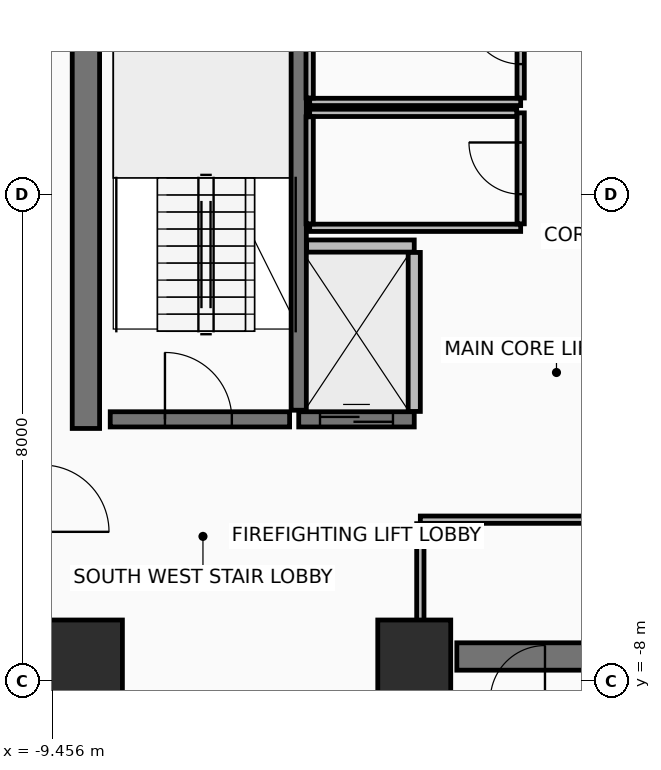
"""IFC4 building model, lengths in metres.
Left out: names, types, materials, properties, quantities, classifications, styles, units other than length and angle.
Written with IfcOpenShell. Run it as: python <this file> out.ifc"""

import sys

from ifc_helpers import new_model, si_unit, direction, frame, frame_2d, origin, origin_2d, place, context, subcontext, project, spatial, rectangle, extrude, element, fill, save


model = new_model("IFC4")
c1 = context("Model", 3, precision=1e-05, world=origin(), true_north=direction((0.0, 1.0)))
c2 = subcontext(c1, "Body", "Model", "MODEL_VIEW")
j1 = project(units=[si_unit("LENGTHUNIT", "METRE"), si_unit("PLANEANGLEUNIT", "RADIAN")], contexts=[c1])
p1 = place(None, origin())
s1 = spatial("IfcSite", under=j1, at=p1, CompositionType="ELEMENT")
p2 = place(p1, origin())
s2 = spatial("IfcBuilding", under=s1, at=p2, CompositionType="ELEMENT")
p3 = place(p2, frame((0.0, 0.0, 181.3)))
s3 = spatial("IfcBuildingStorey", under=s2, at=p3, CompositionType="ELEMENT", Elevation=181.3)
for number, where, z_axis, x_axis in (
    (1, (-8.9, -7.6, 0.0), (0.0, 0.0, 1.0), (1.0, 0.0, 0.0)),
    (2, (-3.5, -7.6, 0.0), (0.0, 0.0, 1.0), (1.0, 0.0, 0.0)),
):
    element("IfcColumn", number, at=place(p3, frame(where, z_axis=z_axis, x_axis=x_axis)), inside=s3, PredefinedType="COLUMN", context=c2, shape_type="SweptSolid", body=[
        extrude(rectangle(XDim=1.2, YDim=1.2, at=origin_2d()), origin(), (0.0, 0.0, 1.0), 3.6),
    ])
p4 = place(p3, frame((-2.8, -7.6, 0.0), z_axis=(0.0, 0.0, 1.0), x_axis=(1.0, 0.0, 0.0)))
e3 = element("IfcWall", 3, at=p4, inside=s3, PredefinedType="SHEAR", context=c2, shape_type="SweptSolid", body=[
    extrude(rectangle(XDim=5.38, YDim=0.45, at=frame_2d((2.69, 0.0))), origin(), (0.0, 0.0, 1.0), 3.42),
])
p5 = place(p3, frame((-8.9, -3.85, 0.0), z_axis=(0.0, 0.0, 1.0), x_axis=(0.0, 1.0, 0.0)))
e4 = element("IfcWall", 4, at=p5, inside=s3, PredefinedType="SHEAR", context=c2, shape_type="SweptSolid", body=[
    extrude(rectangle(XDim=10.7, YDim=0.45, at=frame_2d((5.35, 0.0))), origin(), (0.0, 0.0, 1.0), 3.42),
])
p6 = place(p3, frame((-5.4, -3.55, 0.0), z_axis=(0.0, 0.0, 1.0), x_axis=(0.0, 1.0, 0.0)))
e5 = element("IfcWall", 5, at=p6, inside=s3, PredefinedType="SHEAR", context=c2, shape_type="SweptSolid", body=[
    extrude(rectangle(XDim=7.3, YDim=0.25, at=frame_2d((3.65, 0.0))), origin(), (0.0, 0.0, 1.0), 3.42),
])
p7 = place(p3, frame((-8.5, -3.7, 0.0), z_axis=(0.0, 0.0, 1.0), x_axis=(1.0, 0.0, 0.0)))
e6 = element("IfcWall", 6, at=p7, inside=s3, PredefinedType="SHEAR", context=c2, shape_type="SweptSolid", body=[
    extrude(rectangle(XDim=2.95, YDim=0.25, at=frame_2d((1.475, 0.0))), origin(), (0.0, 0.0, 1.0), 3.42),
])
p8 = place(p7, frame((0.9, 0.0, 0.0)))
e7 = element("IfcOpeningElement", 7, at=p8, cuts=e6, PredefinedType="OPENING", context=c2, shape_type="SweptSolid", body=[
    extrude(rectangle(XDim=1.1, YDim=2.15, at=frame_2d((0.55, 1.075))), frame((0.0, 0.135, 0.0), z_axis=(0.0, -1.0, 0.0), x_axis=(1.0, 0.0, 0.0)), (0.0, 0.0, 1.0), 0.27),
])
p9 = place(p3, frame((-5.4, -3.7, 0.0), z_axis=(0.0, 0.0, 1.0), x_axis=(1.0, 0.0, 0.0)))
e8 = element("IfcWall", 8, at=p9, inside=s3, PredefinedType="SHEAR", context=c2, shape_type="SweptSolid", body=[
    extrude(rectangle(XDim=1.9, YDim=0.25, at=frame_2d((0.95, 0.0))), origin(), (0.0, 0.0, 1.0), 3.42),
])
p10 = place(p9, frame((0.35, 0.0, 0.0)))
e9 = element("IfcOpeningElement", 9, at=p10, cuts=e8, PredefinedType="OPENING", context=c2, shape_type="SweptSolid", body=[
    extrude(rectangle(XDim=1.2, YDim=2.2, at=frame_2d((0.6, 1.1))), frame((0.0, 0.135, 0.0), z_axis=(0.0, -1.0, 0.0), x_axis=(1.0, 0.0, 0.0)), (0.0, 0.0, 1.0), 0.27),
])
p11 = place(p3, frame((-5.27, -0.85, 0.0), z_axis=(0.0, 0.0, 1.0), x_axis=(1.0, 0.0, 0.0)))
e10 = element("IfcWall", 10, at=p11, inside=s3, PredefinedType="PARTITIONING", context=c2, shape_type="SweptSolid", body=[
    extrude(rectangle(XDim=1.77, YDim=0.2, at=frame_2d((0.885, 0.0))), origin(), (0.0, 0.0, 1.0), 3.42),
])
p12 = place(p3, frame((-3.5, -3.57, 0.0), z_axis=(0.0, 0.0, 1.0), x_axis=(0.0, 1.0, 0.0)))
e11 = element("IfcWall", 11, at=p12, inside=s3, PredefinedType="PARTITIONING", context=c2, shape_type="SweptSolid", body=[
    extrude(rectangle(XDim=2.615, YDim=0.2, at=frame_2d((1.308, 0.0))), origin(), (0.0, 0.0, 1.0), 3.42),
])
p13 = place(p3, frame((-5.22, 1.52, 0.0), z_axis=(0.0, 0.0, 1.0), x_axis=(1.0, 0.0, 0.0)))
e12 = element("IfcWall", 12, at=p13, inside=s3, PredefinedType="PARTITIONING", context=c2, shape_type="SweptSolid", body=[
    extrude(rectangle(XDim=3.47, YDim=0.12, at=frame_2d((1.735, 0.0))), origin(), (0.0, 0.0, 1.0), 3.42),
])
p14 = place(p3, frame((-1.75, 1.585, 0.0), z_axis=(0.0, 0.0, 1.0), x_axis=(0.0, 1.0, 0.0)))
e13 = element("IfcWall", 13, at=p14, inside=s3, PredefinedType="PARTITIONING", context=c2, shape_type="SweptSolid", body=[
    extrude(rectangle(XDim=1.965, YDim=0.12, at=frame_2d((0.982, 0.0))), origin(), (0.0, 0.0, 1.0), 3.42),
])
p15 = place(p14, frame((0.557, 0.0, 0.0)))
e14 = element("IfcOpeningElement", 14, at=p15, cuts=e13, PredefinedType="OPENING", context=c2, shape_type="SweptSolid", body=[
    extrude(rectangle(XDim=0.85, YDim=2.1, at=frame_2d((0.425, 1.05))), frame((0.0, 0.07, 0.0), z_axis=(0.0, -1.0, 0.0), x_axis=(1.0, 0.0, 0.0)), (0.0, 0.0, 1.0), 0.14),
])
p16 = place(p3, frame((-5.22, 3.485, 0.0), z_axis=(0.0, 0.0, 1.0), x_axis=(0.0, -1.0, 0.0)))
e15 = element("IfcWall", 15, at=p16, inside=s3, PredefinedType="PARTITIONING", context=c2, shape_type="SweptSolid", body=[
    extrude(rectangle(XDim=1.9, YDim=0.12, at=frame_2d((0.95, 0.0))), origin(), (0.0, 0.0, 1.0), 3.42),
])
p17 = place(p3, frame((-5.22, -0.55, 0.0), z_axis=(0.0, 0.0, 1.0), x_axis=(1.0, 0.0, 0.0)))
e16 = element("IfcWall", 16, at=p17, inside=s3, PredefinedType="PARTITIONING", context=c2, shape_type="SweptSolid", body=[
    extrude(rectangle(XDim=3.47, YDim=0.12, at=frame_2d((1.735, 0.0))), origin(), (0.0, 0.0, 1.0), 3.42),
])
p18 = place(p3, frame((-1.75, -0.485, 0.0), z_axis=(0.0, 0.0, 1.0), x_axis=(0.0, 1.0, 0.0)))
e17 = element("IfcWall", 17, at=p18, inside=s3, PredefinedType="PARTITIONING", context=c2, shape_type="SweptSolid", body=[
    extrude(rectangle(XDim=1.825, YDim=0.12, at=frame_2d((0.913, 0.0))), origin(), (0.0, 0.0, 1.0), 3.42),
])
p19 = place(p18, frame((0.488, 0.0, 0.0)))
e18 = element("IfcOpeningElement", 18, at=p19, cuts=e17, PredefinedType="OPENING", context=c2, shape_type="SweptSolid", body=[
    extrude(rectangle(XDim=0.85, YDim=2.1, at=frame_2d((0.425, 1.05))), frame((0.0, 0.07, 0.0), z_axis=(0.0, -1.0, 0.0), x_axis=(1.0, 0.0, 0.0)), (0.0, 0.0, 1.0), 0.14),
])
p20 = place(p3, frame((-1.815, 1.34, 0.0), z_axis=(0.0, 0.0, 1.0), x_axis=(-1.0, 0.0, 0.0)))
e19 = element("IfcWall", 19, at=p20, inside=s3, PredefinedType="PARTITIONING", context=c2, shape_type="SweptSolid", body=[
    extrude(rectangle(XDim=3.405, YDim=0.12, at=frame_2d((1.703, 0.0))), origin(), (0.0, 0.0, 1.0), 3.42),
])
p21 = place(p3, frame((-5.22, 1.275, 0.0), z_axis=(0.0, 0.0, 1.0), x_axis=(0.0, -1.0, 0.0)))
e20 = element("IfcWall", 20, at=p21, inside=s3, PredefinedType="PARTITIONING", context=c2, shape_type="SweptSolid", body=[
    extrude(rectangle(XDim=1.76, YDim=0.12, at=frame_2d((0.88, 0.0))), origin(), (0.0, 0.0, 1.0), 3.42),
])
p22 = place(p3, frame((-0.265, -5.35, 0.0), z_axis=(0.0, 0.0, 1.0), x_axis=(-1.0, 0.0, 0.0)))
e21 = element("IfcWall", 21, at=p22, inside=s3, PredefinedType="PARTITIONING", context=c2, shape_type="SweptSolid", body=[
    extrude(rectangle(XDim=3.135, YDim=0.12, at=frame_2d((1.567, 0.0))), origin(), (0.0, 0.0, 1.0), 2.715),
])
p23 = place(p3, frame((-3.4, -5.415, 0.0), z_axis=(0.0, 0.0, 1.0), x_axis=(0.0, -1.0, 0.0)))
e22 = element("IfcWall", 22, at=p23, inside=s3, PredefinedType="PARTITIONING", context=c2, shape_type="SweptSolid", body=[
    extrude(rectangle(XDim=2.8, YDim=0.12, at=frame_2d((1.4, 0.0))), origin(), (0.0, 0.0, 1.0), 2.715),
])
p24 = place(p8, origin())
e23 = element("IfcDoor", 23, at=p24, inside=s3, OperationType="SINGLE_SWING_LEFT", PredefinedType="DOOR", context=c2, shape_type="SweptSolid", body=[
    extrude(rectangle(XDim=1.1, YDim=2.15, at=frame_2d((0.55, 1.075))), frame((0.0, 0.025, 0.0), z_axis=(0.0, -1.0, 0.0), x_axis=(1.0, 0.0, 0.0)), (0.0, 0.0, 1.0), 0.05),
])
fill(e7, e23)
p25 = place(p10, origin())
e24 = element("IfcDoor", 24, at=p25, inside=s3, OperationType="SLIDING_TO_RIGHT", PredefinedType="DOOR", context=c2, shape_type="SweptSolid", body=[
    extrude(rectangle(XDim=1.2, YDim=2.2, at=frame_2d((0.6, 1.1))), frame((0.0, 0.025, 0.0), z_axis=(0.0, -1.0, 0.0), x_axis=(1.0, 0.0, 0.0)), (0.0, 0.0, 1.0), 0.05),
])
fill(e9, e24)
p26 = place(p15, frame((0.85, 0.0, 0.0), z_axis=(0.0, 0.0, 1.0), x_axis=(-1.0, 0.0, 0.0)))
e25 = element("IfcDoor", 25, at=p26, inside=s3, OperationType="SINGLE_SWING_RIGHT", PredefinedType="DOOR", context=c2, shape_type="SweptSolid", body=[
    extrude(rectangle(XDim=0.85, YDim=2.1, at=frame_2d((0.425, 1.05))), frame((0.0, 0.025, 0.0), z_axis=(0.0, -1.0, 0.0), x_axis=(1.0, 0.0, 0.0)), (0.0, 0.0, 1.0), 0.05),
])
fill(e14, e25)
p27 = place(p19, frame((0.85, 0.0, 0.0), z_axis=(0.0, 0.0, 1.0), x_axis=(-1.0, 0.0, 0.0)))
e26 = element("IfcDoor", 26, at=p27, inside=s3, OperationType="SINGLE_SWING_RIGHT", PredefinedType="DOOR", context=c2, shape_type="SweptSolid", body=[
    extrude(rectangle(XDim=0.85, YDim=2.1, at=frame_2d((0.425, 1.05))), frame((0.0, 0.025, 0.0), z_axis=(0.0, -1.0, 0.0), x_axis=(1.0, 0.0, 0.0)), (0.0, 0.0, 1.0), 0.05),
])
fill(e18, e26)
save(model, sys.argv[1])
